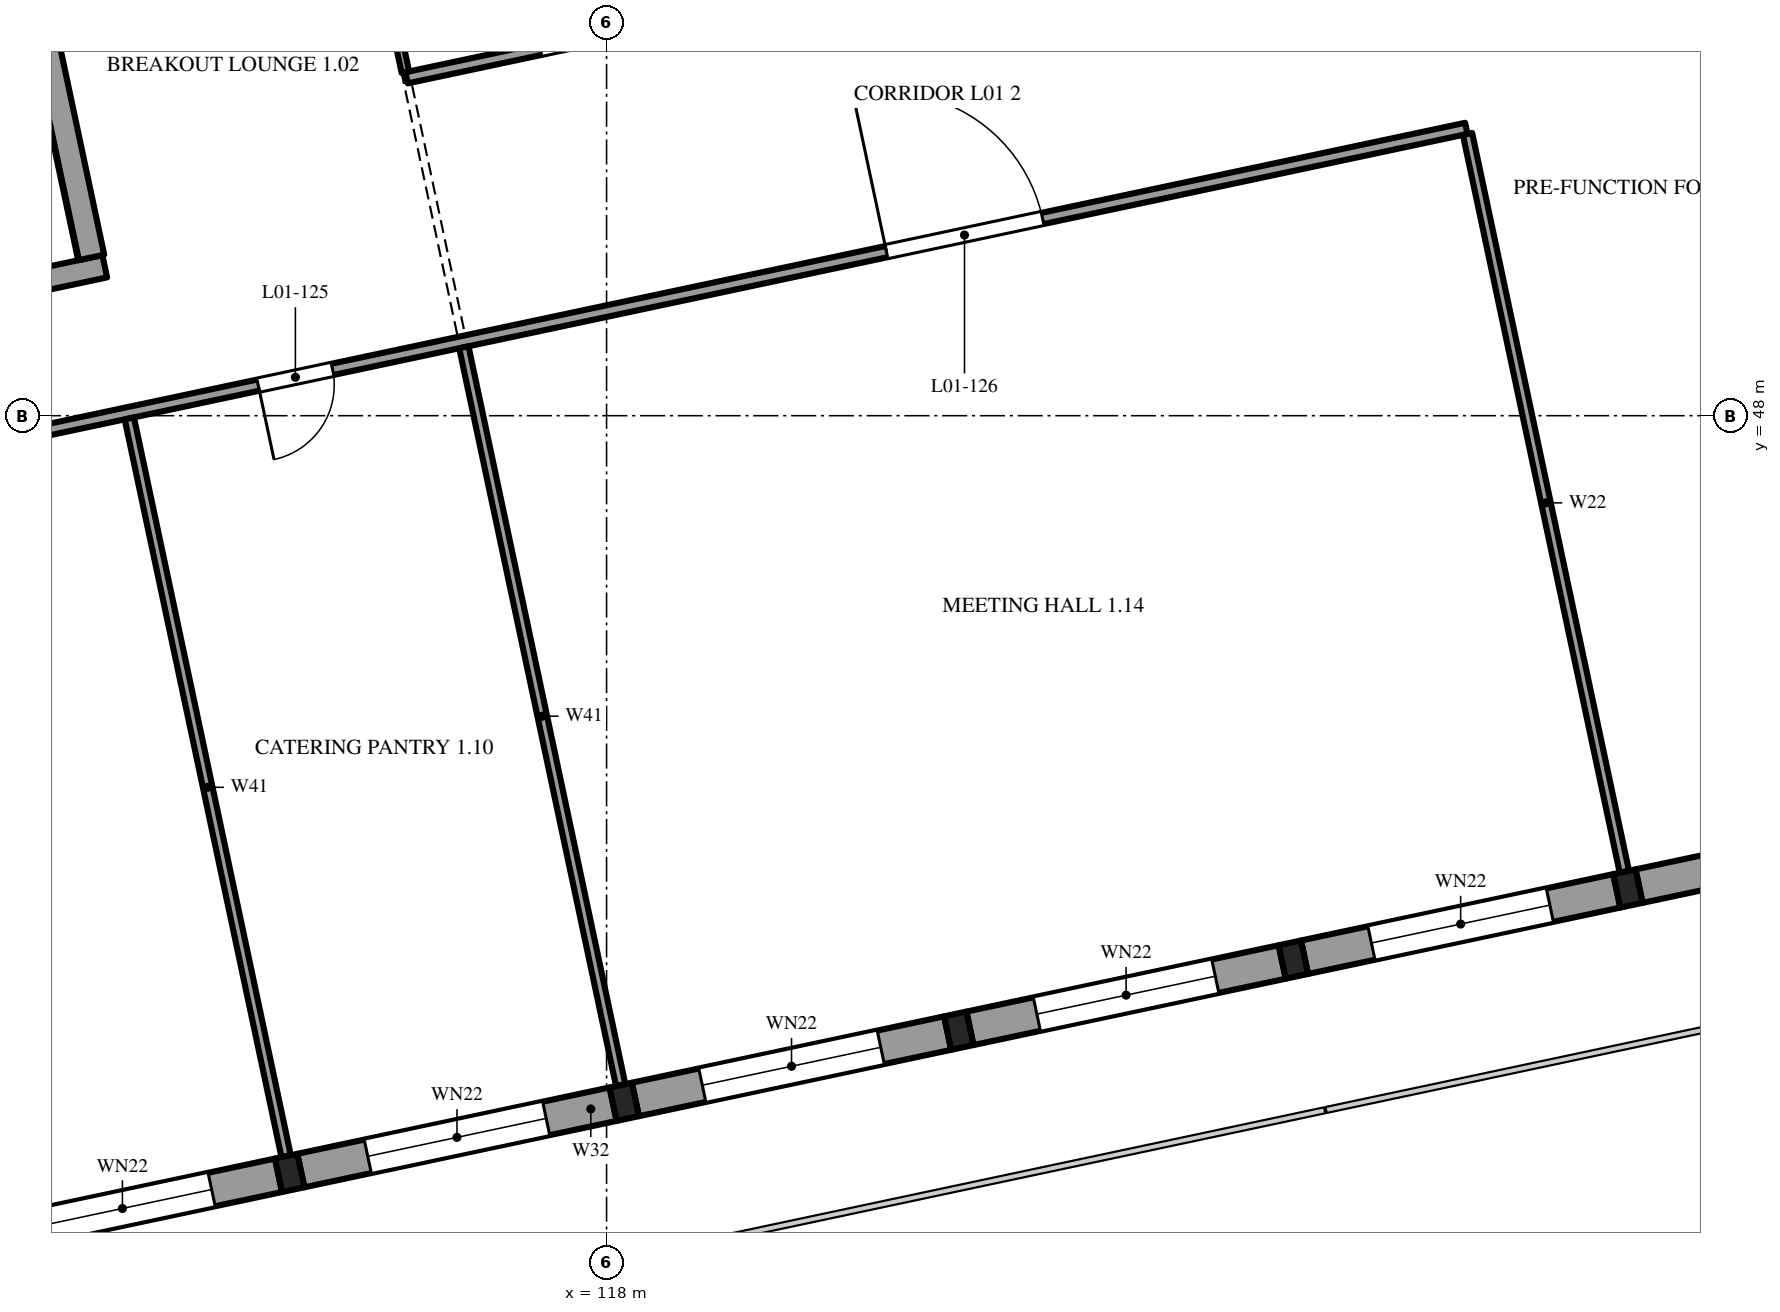
"""IFC4 building model, lengths in metres.
Left out: names, types, materials, properties, quantities, classifications, styles, units other than length and angle.
Written with IfcOpenShell. Run it as: python <this file> out.ifc"""

import sys

from ifc_helpers import new_model, si_unit, direction, frame, frame_2d, origin, origin_2d, place, context, subcontext, project, spatial, rectangle, i_section, extrude, element, fill, save


model = new_model("IFC4")
c1 = context("Model", 3, precision=1e-05, world=origin(), true_north=direction((0.0, 1.0)))
c2 = subcontext(c1, "Body", "Model", "MODEL_VIEW")
j1 = project(units=[si_unit("LENGTHUNIT", "METRE"), si_unit("PLANEANGLEUNIT", "RADIAN")], contexts=[c1])
p1 = place(None, origin())
s1 = spatial("IfcSite", under=j1, at=p1, CompositionType="ELEMENT")
p2 = place(p1, origin())
s2 = spatial("IfcBuilding", under=s1, at=p2, CompositionType="ELEMENT")
p3 = place(p2, frame((0.0, 0.0, 7.2)))
s3 = spatial("IfcBuildingStorey", under=s2, at=p3, CompositionType="ELEMENT", Elevation=7.2)
for number, where, z_axis, x_axis in (
    (1, (113.831, 38.036, 0.0), (0.0, 0.0, 1.0), (0.978, 0.208, 0.0)),
    (2, (118.233, 38.972, 0.0), (0.0, 0.0, 1.0), (0.978, 0.208, 0.0)),
    (3, (122.634, 39.908, 0.0), (0.0, 0.0, 1.0), (0.978, 0.208, 0.0)),
    (4, (127.036, 40.843, 0.0), (0.0, 0.0, 1.0), (0.978, 0.208, 0.0)),
    (5, (131.438, 41.779, 0.0), (0.0, 0.0, 1.0), (0.978, 0.208, 0.0)),
):
    element("IfcColumn", number, at=place(p3, frame(where, z_axis=z_axis, x_axis=x_axis)), inside=s3, PredefinedType="COLUMN", context=c2, shape_type="SweptSolid", body=[
        extrude(i_section(OverallWidth=0.3, OverallDepth=0.45, WebThickness=0.014, FlangeThickness=0.026, FilletRadius=0.027, at=origin_2d()), origin(), (0.0, 0.0, 1.0), 4.8),
    ])
p4 = place(p3, frame((97.997, 47.118, 0.0), z_axis=(0.0, 0.0, 1.0), x_axis=(0.978147662755, 0.20791139903, 0.0)))
e6 = element("IfcWall", 6, at=p4, inside=s3, PredefinedType="SHEAR", context=c2, shape_type="SweptSolid", body=[
    extrude(rectangle(XDim=13.7, YDim=0.3, at=frame_2d((6.85, 0.0))), origin(), (0.0, 0.0, 1.0), 4.8),
])
p5 = place(p4, frame((5.1, 0.0, 0.0)))
e7 = element("IfcOpeningElement", 7, at=p5, cuts=e6, PredefinedType="OPENING", context=c2, shape_type="SweptSolid", body=[
    extrude(rectangle(XDim=1.1, YDim=2.1, at=frame_2d((0.55, 1.05))), frame((0.0, 0.16, 0.0), z_axis=(0.0, -1.0, 0.0), x_axis=(1.0, 0.0, 0.0)), (0.0, 0.0, 1.0), 0.32),
])
p6 = place(p4, frame((7.5, 0.0, 0.0)))
e8 = element("IfcOpeningElement", 8, at=p6, cuts=e6, PredefinedType="OPENING", context=c2, shape_type="SweptSolid", body=[
    extrude(rectangle(XDim=1.1, YDim=2.1, at=frame_2d((0.55, 1.05))), frame((0.0, 0.16, 0.0), z_axis=(0.0, -1.0, 0.0), x_axis=(1.0, 0.0, 0.0)), (0.0, 0.0, 1.0), 0.32),
])
p7 = place(p3, frame((109.556, 57.907, 0.0), z_axis=(0.0, 0.0, 1.0), x_axis=(0.207915693476, -0.978146749934, 0.0)))
e9 = element("IfcWall", 9, at=p7, inside=s3, PredefinedType="SOLIDWALL", context=c2, shape_type="SweptSolid", body=[
    extrude(rectangle(XDim=8.0, YDim=0.35, at=frame_2d((4.0, 0.0))), origin(), (0.0, 0.0, 1.0), 4.8),
])
p8 = place(p7, frame((0.3, 0.0, 0.0)))
e10 = element("IfcOpeningElement", 10, at=p8, cuts=e9, PredefinedType="OPENING", context=c2, shape_type="SweptSolid", body=[
    extrude(rectangle(XDim=1.2, YDim=2.1, at=frame_2d((0.6, 1.05))), frame((0.0, 0.185, 0.0), z_axis=(0.0, -1.0, 0.0), x_axis=(1.0, 0.0, 0.0)), (0.0, 0.0, 1.0), 0.37),
])
p9 = place(p3, frame((109.576, 37.132, 0.0), z_axis=(0.0, 0.0, 1.0), x_axis=(0.978146440129, 0.207917150959, 0.0)))
e11 = element("IfcWall", 11, at=p9, inside=s3, PredefinedType="SOLIDWALL", context=c2, shape_type="SweptSolid", body=[
    extrude(rectangle(XDim=4.2, YDim=0.45, at=frame_2d((2.1, 0.0))), origin(), (0.0, 0.0, 1.0), 4.35),
])
p10 = place(p9, frame((0.9, 0.0, 0.9)))
e12 = element("IfcOpeningElement", 12, at=p10, cuts=e11, PredefinedType="OPENING", context=c2, shape_type="SweptSolid", body=[
    extrude(rectangle(XDim=2.4, YDim=2.4, at=frame_2d((1.2, 1.2))), frame((0.0, 0.235, 0.0), z_axis=(0.0, -1.0, 0.0), x_axis=(1.0, 0.0, 0.0)), (0.0, 0.0, 1.0), 0.47),
])
p11 = place(p3, frame((113.978, 38.068, 0.0), z_axis=(0.0, 0.0, 1.0), x_axis=(0.978143927149, 0.207928972925, 0.0)))
e13 = element("IfcWall", 13, at=p11, inside=s3, PredefinedType="SOLIDWALL", context=c2, shape_type="SweptSolid", body=[
    extrude(rectangle(XDim=4.2, YDim=0.45, at=frame_2d((2.1, 0.0))), origin(), (0.0, 0.0, 1.0), 4.35),
])
p12 = place(p11, frame((0.9, 0.0, 0.9)))
e14 = element("IfcOpeningElement", 14, at=p12, cuts=e13, PredefinedType="OPENING", context=c2, shape_type="SweptSolid", body=[
    extrude(rectangle(XDim=2.4, YDim=2.4, at=frame_2d((1.2, 1.2))), frame((0.0, 0.235, 0.0), z_axis=(0.0, -1.0, 0.0), x_axis=(1.0, 0.0, 0.0)), (0.0, 0.0, 1.0), 0.47),
])
p13 = place(p3, frame((118.379, 39.003, 0.0), z_axis=(0.0, 0.0, 1.0), x_axis=(0.978143927149, 0.207928972925, 0.0)))
e15 = element("IfcWall", 15, at=p13, inside=s3, PredefinedType="SOLIDWALL", context=c2, shape_type="SweptSolid", body=[
    extrude(rectangle(XDim=4.2, YDim=0.45, at=frame_2d((2.1, 0.0))), origin(), (0.0, 0.0, 1.0), 4.35),
])
p14 = place(p13, frame((0.9, 0.0, 0.9)))
e16 = element("IfcOpeningElement", 16, at=p14, cuts=e15, PredefinedType="OPENING", context=c2, shape_type="SweptSolid", body=[
    extrude(rectangle(XDim=2.4, YDim=2.4, at=frame_2d((1.2, 1.2))), frame((0.0, 0.235, 0.0), z_axis=(0.0, -1.0, 0.0), x_axis=(1.0, 0.0, 0.0)), (0.0, 0.0, 1.0), 0.47),
])
p15 = place(p3, frame((122.781, 39.939, 0.0), z_axis=(0.0, 0.0, 1.0), x_axis=(0.978155748334, 0.207873355681, 0.0)))
e17 = element("IfcWall", 17, at=p15, inside=s3, PredefinedType="SOLIDWALL", context=c2, shape_type="SweptSolid", body=[
    extrude(rectangle(XDim=4.2, YDim=0.45, at=frame_2d((2.1, 0.0))), origin(), (0.0, 0.0, 1.0), 4.35),
])
p16 = place(p15, frame((0.9, 0.0, 0.9)))
e18 = element("IfcOpeningElement", 18, at=p16, cuts=e17, PredefinedType="OPENING", context=c2, shape_type="SweptSolid", body=[
    extrude(rectangle(XDim=2.4, YDim=2.4, at=frame_2d((1.2, 1.2))), frame((0.0, 0.235, 0.0), z_axis=(0.0, -1.0, 0.0), x_axis=(1.0, 0.0, 0.0)), (0.0, 0.0, 1.0), 0.47),
])
p17 = place(p3, frame((127.183, 40.875, 0.0), z_axis=(0.0, 0.0, 1.0), x_axis=(0.978146440129, 0.207917150959, 0.0)))
e19 = element("IfcWall", 19, at=p17, inside=s3, PredefinedType="SOLIDWALL", context=c2, shape_type="SweptSolid", body=[
    extrude(rectangle(XDim=4.2, YDim=0.45, at=frame_2d((2.1, 0.0))), origin(), (0.0, 0.0, 1.0), 4.35),
])
p18 = place(p17, frame((0.9, 0.0, 0.9)))
e20 = element("IfcOpeningElement", 20, at=p18, cuts=e19, PredefinedType="OPENING", context=c2, shape_type="SweptSolid", body=[
    extrude(rectangle(XDim=2.4, YDim=2.4, at=frame_2d((1.2, 1.2))), frame((0.0, 0.235, 0.0), z_axis=(0.0, -1.0, 0.0), x_axis=(1.0, 0.0, 0.0)), (0.0, 0.0, 1.0), 0.47),
])
p19 = place(p3, frame((131.584, 41.81, 0.0), z_axis=(0.0, 0.0, 1.0), x_axis=(0.978146440129, 0.207917150959, 0.0)))
e21 = element("IfcWall", 21, at=p19, inside=s3, PredefinedType="SOLIDWALL", context=c2, shape_type="SweptSolid", body=[
    extrude(rectangle(XDim=4.2, YDim=0.45, at=frame_2d((2.1, 0.0))), origin(), (0.0, 0.0, 1.0), 4.35),
])
p20 = place(p19, frame((0.9, 0.0, 0.45)))
e22 = element("IfcOpeningElement", 22, at=p20, cuts=e21, PredefinedType="OPENING", context=c2, shape_type="SweptSolid", body=[
    extrude(rectangle(XDim=2.4, YDim=3.3, at=frame_2d((1.2, 1.65))), frame((0.0, 0.235, 0.0), z_axis=(0.0, -1.0, 0.0), x_axis=(1.0, 0.0, 0.0)), (0.0, 0.0, 1.0), 0.47),
])
p21 = place(p3, frame((80.893, 41.489, 0.0), z_axis=(0.0, 0.0, 1.0), x_axis=(0.97814724207, 0.20791337819, 0.0)))
e23 = element("IfcWall", 23, at=p21, inside=s3, PredefinedType="PARTITIONING", context=c2, shape_type="SweptSolid", body=[
    extrude(rectangle(XDim=49.5, YDim=0.15, at=frame_2d((24.75, 0.0))), origin(), (0.0, 0.0, 1.0), 3.75),
])
p22 = place(p21, frame((5.85, 0.0, 0.0)))
e24 = element("IfcOpeningElement", 24, at=p22, cuts=e23, PredefinedType="OPENING", context=c2, shape_type="SweptSolid", body=[
    extrude(rectangle(XDim=1.8, YDim=2.1, at=frame_2d((0.9, 1.05))), frame((0.0, 0.085, 0.0), z_axis=(0.0, -1.0, 0.0), x_axis=(1.0, 0.0, 0.0)), (0.0, 0.0, 1.0), 0.17),
])
p23 = place(p21, frame((17.1, 0.0, 0.0)))
e25 = element("IfcOpeningElement", 25, at=p23, cuts=e23, PredefinedType="OPENING", context=c2, shape_type="SweptSolid", body=[
    extrude(rectangle(XDim=1.8, YDim=2.1, at=frame_2d((0.9, 1.05))), frame((0.0, 0.085, 0.0), z_axis=(0.0, -1.0, 0.0), x_axis=(1.0, 0.0, 0.0)), (0.0, 0.0, 1.0), 0.17),
])
p24 = place(p21, frame((26.1, 0.0, 0.0)))
e26 = element("IfcOpeningElement", 26, at=p24, cuts=e23, PredefinedType="OPENING", context=c2, shape_type="SweptSolid", body=[
    extrude(rectangle(XDim=1.8, YDim=2.1, at=frame_2d((0.9, 1.05))), frame((0.0, 0.085, 0.0), z_axis=(0.0, -1.0, 0.0), x_axis=(1.0, 0.0, 0.0)), (0.0, 0.0, 1.0), 0.17),
])
p25 = place(p21, frame((33.25, 0.0, 0.0)))
e27 = element("IfcOpeningElement", 27, at=p25, cuts=e23, PredefinedType="OPENING", context=c2, shape_type="SweptSolid", body=[
    extrude(rectangle(XDim=1.0, YDim=2.1, at=frame_2d((0.5, 1.05))), frame((0.0, 0.085, 0.0), z_axis=(0.0, -1.0, 0.0), x_axis=(1.0, 0.0, 0.0)), (0.0, 0.0, 1.0), 0.17),
])
p26 = place(p21, frame((41.7, 0.0, 0.0)))
e28 = element("IfcOpeningElement", 28, at=p26, cuts=e23, PredefinedType="OPENING", context=c2, shape_type="SweptSolid", body=[
    extrude(rectangle(XDim=2.1, YDim=2.4, at=frame_2d((1.05, 1.2))), frame((0.0, 0.085, 0.0), z_axis=(0.0, -1.0, 0.0), x_axis=(1.0, 0.0, 0.0)), (0.0, 0.0, 1.0), 0.17),
])
p27 = place(p3, frame((113.784, 38.257, 0.0), z_axis=(0.0, 0.0, 1.0), x_axis=(-0.20790935802, 0.978148096582, 0.0)))
e29 = element("IfcWall", 29, at=p27, inside=s3, PredefinedType="PARTITIONING", context=c2, shape_type="SweptSolid", body=[
    extrude(rectangle(XDim=9.925, YDim=0.125, at=frame_2d((4.962, 0.0))), origin(), (0.0, 0.0, 1.0), 3.75),
])
p28 = place(p3, frame((118.186, 39.192, 0.0), z_axis=(0.0, 0.0, 1.0), x_axis=(-0.207904355568, 0.978149159861, 0.0)))
e30 = element("IfcWall", 30, at=p28, inside=s3, PredefinedType="PARTITIONING", context=c2, shape_type="SweptSolid", body=[
    extrude(rectangle(XDim=9.925, YDim=0.125, at=frame_2d((4.962, 0.0))), origin(), (0.0, 0.0, 1.0), 3.75),
])
p29 = place(p3, frame((131.391, 41.999, 0.0), z_axis=(0.0, 0.0, 1.0), x_axis=(-0.20790935802, 0.978148096582, 0.0)))
e31 = element("IfcWall", 31, at=p29, inside=s3, PredefinedType="PARTITIONING", context=c2, shape_type="SweptSolid", body=[
    extrude(rectangle(XDim=9.925, YDim=0.125, at=frame_2d((4.962, 0.0))), origin(), (0.0, 0.0, 1.0), 3.75),
])
p30 = place(p3, frame((115.369, 52.446, 0.0), z_axis=(0.0, 0.0, 1.0), x_axis=(0.978147028863, 0.207914381239, 0.0)))
e32 = element("IfcWall", 32, at=p30, inside=s3, PredefinedType="PARTITIONING", context=c2, shape_type="SweptSolid", body=[
    extrude(rectangle(XDim=49.5, YDim=0.15, at=frame_2d((24.75, 0.0))), origin(), (0.0, 0.0, 1.0), 3.75),
])
p31 = place(p30, frame((1.8, 0.0, 0.0)))
e33 = element("IfcOpeningElement", 33, at=p31, cuts=e32, PredefinedType="OPENING", context=c2, shape_type="SweptSolid", body=[
    extrude(rectangle(XDim=0.9, YDim=2.1, at=frame_2d((0.45, 1.05))), frame((0.0, 0.085, 0.0), z_axis=(0.0, -1.0, 0.0), x_axis=(1.0, 0.0, 0.0)), (0.0, 0.0, 1.0), 0.17),
])
p32 = place(p30, frame((6.3, 0.0, 0.0)))
e34 = element("IfcOpeningElement", 34, at=p32, cuts=e32, PredefinedType="OPENING", context=c2, shape_type="SweptSolid", body=[
    extrude(rectangle(XDim=0.9, YDim=2.1, at=frame_2d((0.45, 1.05))), frame((0.0, 0.085, 0.0), z_axis=(0.0, -1.0, 0.0), x_axis=(1.0, 0.0, 0.0)), (0.0, 0.0, 1.0), 0.17),
])
p33 = place(p30, frame((10.7, 0.0, 0.0)))
e35 = element("IfcOpeningElement", 35, at=p33, cuts=e32, PredefinedType="OPENING", context=c2, shape_type="SweptSolid", body=[
    extrude(rectangle(XDim=1.1, YDim=2.1, at=frame_2d((0.55, 1.05))), frame((0.0, 0.085, 0.0), z_axis=(0.0, -1.0, 0.0), x_axis=(1.0, 0.0, 0.0)), (0.0, 0.0, 1.0), 0.17),
])
p34 = place(p30, frame((15.25, 0.0, 0.0)))
e36 = element("IfcOpeningElement", 36, at=p34, cuts=e32, PredefinedType="OPENING", context=c2, shape_type="SweptSolid", body=[
    extrude(rectangle(XDim=1.0, YDim=2.1, at=frame_2d((0.5, 1.05))), frame((0.0, 0.085, 0.0), z_axis=(0.0, -1.0, 0.0), x_axis=(1.0, 0.0, 0.0)), (0.0, 0.0, 1.0), 0.17),
])
p35 = place(p30, frame((19.75, 0.0, 0.0)))
e37 = element("IfcOpeningElement", 37, at=p35, cuts=e32, PredefinedType="OPENING", context=c2, shape_type="SweptSolid", body=[
    extrude(rectangle(XDim=1.0, YDim=2.1, at=frame_2d((0.5, 1.05))), frame((0.0, 0.085, 0.0), z_axis=(0.0, -1.0, 0.0), x_axis=(1.0, 0.0, 0.0)), (0.0, 0.0, 1.0), 0.17),
])
p36 = place(p30, frame((28.35, 0.0, 0.0)))
e38 = element("IfcOpeningElement", 38, at=p36, cuts=e32, PredefinedType="OPENING", context=c2, shape_type="SweptSolid", body=[
    extrude(rectangle(XDim=1.8, YDim=2.1, at=frame_2d((0.9, 1.05))), frame((0.0, 0.085, 0.0), z_axis=(0.0, -1.0, 0.0), x_axis=(1.0, 0.0, 0.0)), (0.0, 0.0, 1.0), 0.17),
])
p37 = place(p30, frame((39.6, 0.0, 0.0)))
e39 = element("IfcOpeningElement", 39, at=p37, cuts=e32, PredefinedType="OPENING", context=c2, shape_type="SweptSolid", body=[
    extrude(rectangle(XDim=1.8, YDim=2.1, at=frame_2d((0.9, 1.05))), frame((0.0, 0.085, 0.0), z_axis=(0.0, -1.0, 0.0), x_axis=(1.0, 0.0, 0.0)), (0.0, 0.0, 1.0), 0.17),
])
p38 = place(p30, frame((46.8, 0.0, 0.0)))
e40 = element("IfcOpeningElement", 40, at=p38, cuts=e32, PredefinedType="OPENING", context=c2, shape_type="SweptSolid", body=[
    extrude(rectangle(XDim=0.9, YDim=2.1, at=frame_2d((0.45, 1.05))), frame((0.0, 0.085, 0.0), z_axis=(0.0, -1.0, 0.0), x_axis=(1.0, 0.0, 0.0)), (0.0, 0.0, 1.0), 0.17),
])
p39 = place(p3, frame((113.29, 62.228, 0.0), z_axis=(0.0, 0.0, 1.0), x_axis=(0.20790935802, -0.978148096582, 0.0)))
e41 = element("IfcWall", 41, at=p39, inside=s3, PredefinedType="PARTITIONING", context=c2, shape_type="SweptSolid", body=[
    extrude(rectangle(XDim=9.925, YDim=0.1, at=frame_2d((4.962, 0.0))), origin(), (0.0, 0.0, 1.0), 3.75),
])
p40 = place(p10, origin())
e42 = element("IfcWindow", 42, at=p40, inside=s3, PartitioningType="SINGLE_PANEL", PredefinedType="WINDOW", context=c2, shape_type="SweptSolid", body=[
    extrude(rectangle(XDim=2.4, YDim=2.4, at=frame_2d((1.2, 1.2))), frame((0.0, 0.03, 0.0), z_axis=(0.0, -1.0, 0.0), x_axis=(1.0, 0.0, 0.0)), (0.0, 0.0, 1.0), 0.06),
])
fill(e12, e42)
p41 = place(p12, origin())
e43 = element("IfcWindow", 43, at=p41, inside=s3, PartitioningType="SINGLE_PANEL", PredefinedType="WINDOW", context=c2, shape_type="SweptSolid", body=[
    extrude(rectangle(XDim=2.4, YDim=2.4, at=frame_2d((1.2, 1.2))), frame((0.0, 0.03, 0.0), z_axis=(0.0, -1.0, 0.0), x_axis=(1.0, 0.0, 0.0)), (0.0, 0.0, 1.0), 0.06),
])
fill(e14, e43)
p42 = place(p14, origin())
e44 = element("IfcWindow", 44, at=p42, inside=s3, PartitioningType="SINGLE_PANEL", PredefinedType="WINDOW", context=c2, shape_type="SweptSolid", body=[
    extrude(rectangle(XDim=2.4, YDim=2.4, at=frame_2d((1.2, 1.2))), frame((0.0, 0.03, 0.0), z_axis=(0.0, -1.0, 0.0), x_axis=(1.0, 0.0, 0.0)), (0.0, 0.0, 1.0), 0.06),
])
fill(e16, e44)
p43 = place(p16, origin())
e45 = element("IfcWindow", 45, at=p43, inside=s3, PartitioningType="SINGLE_PANEL", PredefinedType="WINDOW", context=c2, shape_type="SweptSolid", body=[
    extrude(rectangle(XDim=2.4, YDim=2.4, at=frame_2d((1.2, 1.2))), frame((0.0, 0.03, 0.0), z_axis=(0.0, -1.0, 0.0), x_axis=(1.0, 0.0, 0.0)), (0.0, 0.0, 1.0), 0.06),
])
fill(e18, e45)
p44 = place(p18, origin())
e46 = element("IfcWindow", 46, at=p44, inside=s3, PartitioningType="SINGLE_PANEL", PredefinedType="WINDOW", context=c2, shape_type="SweptSolid", body=[
    extrude(rectangle(XDim=2.4, YDim=2.4, at=frame_2d((1.2, 1.2))), frame((0.0, 0.03, 0.0), z_axis=(0.0, -1.0, 0.0), x_axis=(1.0, 0.0, 0.0)), (0.0, 0.0, 1.0), 0.06),
])
fill(e20, e46)
p45 = place(p25, frame((1.0, 0.0, 0.0), z_axis=(0.0, 0.0, 1.0), x_axis=(-1.0, 0.0, 0.0)))
e47 = element("IfcDoor", 47, at=p45, inside=s3, OperationType="SINGLE_SWING_RIGHT", PredefinedType="DOOR", context=c2, shape_type="SweptSolid", body=[
    extrude(rectangle(XDim=1.0, YDim=2.1, at=frame_2d((0.5, 1.05))), frame((0.0, 0.025, 0.0), z_axis=(0.0, -1.0, 0.0), x_axis=(1.0, 0.0, 0.0)), (0.0, 0.0, 1.0), 0.05),
])
fill(e27, e47)
p46 = place(p26, origin())
e48 = element("IfcDoor", 48, at=p46, inside=s3, OperationType="DOUBLE_DOOR_SINGLE_SWING", PredefinedType="DOOR", context=c2, shape_type="SweptSolid", body=[
    extrude(rectangle(XDim=2.1, YDim=2.4, at=frame_2d((1.05, 1.2))), frame((0.0, 0.025, 0.0), z_axis=(0.0, -1.0, 0.0), x_axis=(1.0, 0.0, 0.0)), (0.0, 0.0, 1.0), 0.05),
])
fill(e28, e48)
save(model, sys.argv[1])
